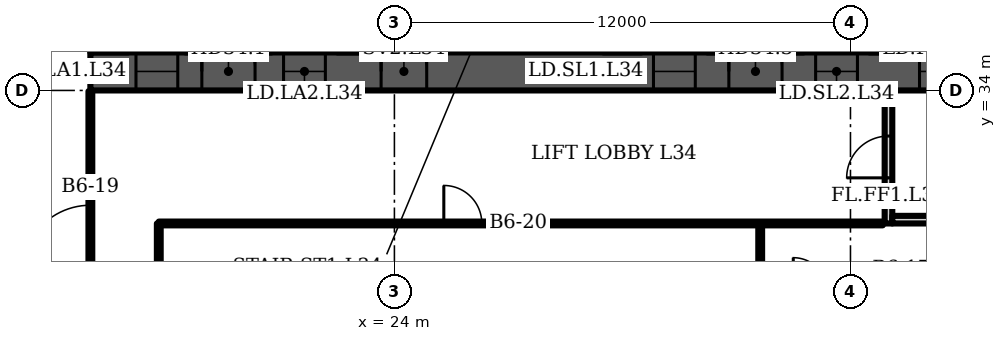
"""IFC4 building model, lengths in metres.
Left out: names, types, materials, properties, quantities, classifications, styles, units other than length and angle.
Written with IfcOpenShell. Run it as: python <this file> out.ifc"""

import sys

from ifc_helpers import new_model, si_unit, direction, frame, frame_2d, origin, place, context, subcontext, project, spatial, rectangle, extrude, element, fill, save


model = new_model("IFC4")
c1 = context("Model", 3, precision=1e-05, world=origin(), true_north=direction((0.0, 1.0)))
c2 = subcontext(c1, "Body", "Model", "MODEL_VIEW")
j1 = project(units=[si_unit("LENGTHUNIT", "METRE"), si_unit("PLANEANGLEUNIT", "RADIAN")], contexts=[c1])
p1 = place(None, origin())
s1 = spatial("IfcSite", under=j1, at=p1, CompositionType="ELEMENT")
p2 = place(p1, origin())
s2 = spatial("IfcBuilding", under=s1, at=p2, CompositionType="ELEMENT")
p3 = place(p2, frame((0.0, 0.0, 143.5)))
s3 = spatial("IfcBuildingStorey", under=s2, at=p3, CompositionType="ELEMENT", Elevation=143.5)
p4 = place(p3, frame((16.0, 34.5, 0.0), z_axis=(0.0, 0.0, 1.0), x_axis=(1.0, 0.0, 0.0)))
e1 = element("IfcWall", 1, at=p4, inside=s3, PredefinedType="SHEAR", context=c2, shape_type="SweptSolid", body=[
    extrude(rectangle(XDim=49.0, YDim=1.0, at=frame_2d((24.5, 0.0))), origin(), (0.0, 0.0, 1.0), 3.6),
])
p5 = place(p4, frame((1.2, 0.0, 0.0)))
e2 = element("IfcOpeningElement", 2, at=p5, cuts=e1, PredefinedType="OPENING", context=c2, shape_type="SweptSolid", body=[
    extrude(rectangle(XDim=1.1, YDim=2.1, at=frame_2d((0.55, 1.05))), frame((0.0, 0.51, 0.0), z_axis=(0.0, -1.0, 0.0), x_axis=(1.0, 0.0, 0.0)), (0.0, 0.0, 1.0), 1.02),
])
p6 = place(p4, frame((5.083, 0.0, 0.0)))
e3 = element("IfcOpeningElement", 3, at=p6, cuts=e1, PredefinedType="OPENING", context=c2, shape_type="SweptSolid", body=[
    extrude(rectangle(XDim=1.1, YDim=2.1, at=frame_2d((0.55, 1.05))), frame((0.0, 0.51, 0.0), z_axis=(0.0, -1.0, 0.0), x_axis=(1.0, 0.0, 0.0)), (0.0, 0.0, 1.0), 1.02),
])
p7 = place(p4, frame((2.933, 0.0, 0.0)))
e4 = element("IfcOpeningElement", 4, at=p7, cuts=e1, PredefinedType="OPENING", context=c2, shape_type="SweptSolid", body=[
    extrude(rectangle(XDim=1.4, YDim=2.1, at=frame_2d((0.7, 1.05))), frame((0.0, 0.51, 0.0), z_axis=(0.0, -1.0, 0.0), x_axis=(1.0, 0.0, 0.0)), (0.0, 0.0, 1.0), 1.02),
])
p8 = place(p4, frame((7.65, 0.0, 0.0)))
e5 = element("IfcOpeningElement", 5, at=p8, cuts=e1, PredefinedType="OPENING", context=c2, shape_type="SweptSolid", body=[
    extrude(rectangle(XDim=1.2, YDim=2.1, at=frame_2d((0.6, 1.05))), frame((0.0, 0.51, 0.0), z_axis=(0.0, -1.0, 0.0), x_axis=(1.0, 0.0, 0.0)), (0.0, 0.0, 1.0), 1.02),
])
p9 = place(p4, frame((14.817, 0.0, 0.0)))
e6 = element("IfcOpeningElement", 6, at=p9, cuts=e1, PredefinedType="OPENING", context=c2, shape_type="SweptSolid", body=[
    extrude(rectangle(XDim=1.1, YDim=2.1, at=frame_2d((0.55, 1.05))), frame((0.0, 0.51, 0.0), z_axis=(0.0, -1.0, 0.0), x_axis=(1.0, 0.0, 0.0)), (0.0, 0.0, 1.0), 1.02),
])
p10 = place(p4, frame((19.083, 0.0, 0.0)))
e7 = element("IfcOpeningElement", 7, at=p10, cuts=e1, PredefinedType="OPENING", context=c2, shape_type="SweptSolid", body=[
    extrude(rectangle(XDim=1.1, YDim=2.1, at=frame_2d((0.55, 1.05))), frame((0.0, 0.51, 0.0), z_axis=(0.0, -1.0, 0.0), x_axis=(1.0, 0.0, 0.0)), (0.0, 0.0, 1.0), 1.02),
])
p11 = place(p4, frame((16.8, 0.0, 0.0)))
e8 = element("IfcOpeningElement", 8, at=p11, cuts=e1, PredefinedType="OPENING", context=c2, shape_type="SweptSolid", body=[
    extrude(rectangle(XDim=1.4, YDim=2.1, at=frame_2d((0.7, 1.05))), frame((0.0, 0.51, 0.0), z_axis=(0.0, -1.0, 0.0), x_axis=(1.0, 0.0, 0.0)), (0.0, 0.0, 1.0), 1.02),
])
p12 = place(p4, frame((21.817, 0.0, 0.0)))
e9 = element("IfcOpeningElement", 9, at=p12, cuts=e1, PredefinedType="OPENING", context=c2, shape_type="SweptSolid", body=[
    extrude(rectangle(XDim=1.1, YDim=2.1, at=frame_2d((0.55, 1.05))), frame((0.0, 0.51, 0.0), z_axis=(0.0, -1.0, 0.0), x_axis=(1.0, 0.0, 0.0)), (0.0, 0.0, 1.0), 1.02),
])
p13 = place(p4, frame((26.083, 0.0, 0.0)))
e10 = element("IfcOpeningElement", 10, at=p13, cuts=e1, PredefinedType="OPENING", context=c2, shape_type="SweptSolid", body=[
    extrude(rectangle(XDim=1.1, YDim=2.1, at=frame_2d((0.55, 1.05))), frame((0.0, 0.51, 0.0), z_axis=(0.0, -1.0, 0.0), x_axis=(1.0, 0.0, 0.0)), (0.0, 0.0, 1.0), 1.02),
])
p14 = place(p4, frame((33.15, 0.0, 0.0)))
e11 = element("IfcOpeningElement", 11, at=p14, cuts=e1, PredefinedType="OPENING", context=c2, shape_type="SweptSolid", body=[
    extrude(rectangle(XDim=1.2, YDim=2.1, at=frame_2d((0.6, 1.05))), frame((0.0, 0.51, 0.0), z_axis=(0.0, -1.0, 0.0), x_axis=(1.0, 0.0, 0.0)), (0.0, 0.0, 1.0), 1.02),
])
p15 = place(p4, frame((37.8, 0.0, 0.0)))
e12 = element("IfcOpeningElement", 12, at=p15, cuts=e1, PredefinedType="OPENING", context=c2, shape_type="SweptSolid", body=[
    extrude(rectangle(XDim=1.4, YDim=2.1, at=frame_2d((0.7, 1.05))), frame((0.0, 0.51, 0.0), z_axis=(0.0, -1.0, 0.0), x_axis=(1.0, 0.0, 0.0)), (0.0, 0.0, 1.0), 1.02),
])
p16 = place(p4, frame((42.817, 0.0, 0.0)))
e13 = element("IfcOpeningElement", 13, at=p16, cuts=e1, PredefinedType="OPENING", context=c2, shape_type="SweptSolid", body=[
    extrude(rectangle(XDim=1.1, YDim=2.1, at=frame_2d((0.55, 1.05))), frame((0.0, 0.51, 0.0), z_axis=(0.0, -1.0, 0.0), x_axis=(1.0, 0.0, 0.0)), (0.0, 0.0, 1.0), 1.02),
])
p17 = place(p4, frame((46.7, 0.0, 0.0)))
e14 = element("IfcOpeningElement", 14, at=p17, cuts=e1, PredefinedType="OPENING", context=c2, shape_type="SweptSolid", body=[
    extrude(rectangle(XDim=1.1, YDim=2.1, at=frame_2d((0.55, 1.05))), frame((0.0, 0.51, 0.0), z_axis=(0.0, -1.0, 0.0), x_axis=(1.0, 0.0, 0.0)), (0.0, 0.0, 1.0), 1.02),
])
p18 = place(p4, frame((44.667, 0.0, 0.0)))
e15 = element("IfcOpeningElement", 15, at=p18, cuts=e1, PredefinedType="OPENING", context=c2, shape_type="SweptSolid", body=[
    extrude(rectangle(XDim=1.4, YDim=2.1, at=frame_2d((0.7, 1.05))), frame((0.0, 0.51, 0.0), z_axis=(0.0, -1.0, 0.0), x_axis=(1.0, 0.0, 0.0)), (0.0, 0.0, 1.0), 1.02),
])
p19 = place(p3, frame((37.0, 30.5, 0.0), z_axis=(0.0, 0.0, 1.0), x_axis=(0.0, 1.0, 0.0)))
e16 = element("IfcWall", 16, at=p19, inside=s3, PredefinedType="PARTITIONING", context=c2, shape_type="SweptSolid", body=[
    extrude(rectangle(XDim=3.5, YDim=0.2, at=frame_2d((1.75, 0.0))), origin(), (0.0, 0.0, 1.0), 3.15),
])
p20 = place(p19, frame((1.2, 0.0, 0.0)))
e17 = element("IfcOpeningElement", 17, at=p20, cuts=e16, PredefinedType="OPENING", context=c2, shape_type="SweptSolid", body=[
    extrude(rectangle(XDim=1.1, YDim=2.1, at=frame_2d((0.55, 1.05))), frame((0.0, 0.11, 0.0), z_axis=(0.0, -1.0, 0.0), x_axis=(1.0, 0.0, 0.0)), (0.0, 0.0, 1.0), 0.22),
])
p21 = place(p3, frame((37.1, 30.6, 0.0), z_axis=(0.0, 0.0, 1.0), x_axis=(1.0, 0.0, 0.0)))
e18 = element("IfcWall", 18, at=p21, inside=s3, PredefinedType="PARTITIONING", context=c2, shape_type="SweptSolid", body=[
    extrude(rectangle(XDim=2.8, YDim=0.2, at=frame_2d((1.4, 0.0))), origin(), (0.0, 0.0, 1.0), 3.15),
])
p22 = place(p3, frame((16.0, 26.22, 0.0), z_axis=(0.0, 0.0, 1.0), x_axis=(0.0, 1.0, 0.0)))
e19 = element("IfcWall", 19, at=p22, inside=s3, PredefinedType="PARTITIONING", context=c2, shape_type="SweptSolid", body=[
    extrude(rectangle(XDim=7.76, YDim=0.1, at=frame_2d((3.88, 0.0))), origin(), (0.0, 0.0, 1.0), 3.15),
])
p23 = place(p22, frame((2.96, 0.0, 0.0)))
e20 = element("IfcOpeningElement", 20, at=p23, cuts=e19, PredefinedType="OPENING", context=c2, shape_type="SweptSolid", body=[
    extrude(rectangle(XDim=1.8, YDim=2.1, at=frame_2d((0.9, 1.05))), frame((0.0, 0.06, 0.0), z_axis=(0.0, -1.0, 0.0), x_axis=(1.0, 0.0, 0.0)), (0.0, 0.0, 1.0), 0.12),
])
p24 = place(p3, frame((17.8, 23.935, 0.0), z_axis=(0.0, 0.0, 1.0), x_axis=(0.0, 1.0, 0.0)))
e21 = element("IfcWall", 21, at=p24, inside=s3, PredefinedType="PARTITIONING", context=c2, shape_type="SweptSolid", body=[
    extrude(rectangle(XDim=6.565, YDim=0.1, at=frame_2d((3.282, 0.0))), origin(), (0.0, 0.0, 1.0), 3.15),
])
p25 = place(p3, frame((17.8, 30.5, 0.0), z_axis=(0.0, 0.0, 1.0), x_axis=(1.0, 0.0, 0.0)))
e22 = element("IfcWall", 22, at=p25, inside=s3, PredefinedType="PARTITIONING", context=c2, shape_type="SweptSolid", body=[
    extrude(rectangle(XDim=19.05, YDim=0.1, at=frame_2d((9.525, 0.0))), origin(), (0.0, 0.0, 1.0), 3.15),
])
p26 = place(p25, frame((7.5, 0.0, 0.0)))
e23 = element("IfcOpeningElement", 23, at=p26, cuts=e22, PredefinedType="OPENING", context=c2, shape_type="SweptSolid", body=[
    extrude(rectangle(XDim=1.0, YDim=2.1, at=frame_2d((0.5, 1.05))), frame((0.0, 0.06, 0.0), z_axis=(0.0, -1.0, 0.0), x_axis=(1.0, 0.0, 0.0)), (0.0, 0.0, 1.0), 0.12),
])
p27 = place(p3, frame((33.625, 14.53, 0.0), z_axis=(0.0, 0.0, 1.0), x_axis=(0.0, 1.0, 0.0)))
e24 = element("IfcWall", 24, at=p27, inside=s3, PredefinedType="PARTITIONING", context=c2, shape_type="SweptSolid", body=[
    extrude(rectangle(XDim=15.96, YDim=0.1, at=frame_2d((7.98, 0.0))), origin(), (0.0, 0.0, 1.0), 3.15),
])
p28 = place(p5, origin())
e25 = element("IfcDoor", 25, at=p28, inside=s3, OperationType="DOUBLE_DOOR_SLIDING", PredefinedType="DOOR", context=c2, shape_type="SweptSolid", body=[
    extrude(rectangle(XDim=1.1, YDim=2.1, at=frame_2d((0.55, 1.05))), frame((0.0, 0.025, 0.0), z_axis=(0.0, -1.0, 0.0), x_axis=(1.0, 0.0, 0.0)), (0.0, 0.0, 1.0), 0.05),
])
fill(e2, e25)
p29 = place(p6, origin())
e26 = element("IfcDoor", 26, at=p29, inside=s3, OperationType="DOUBLE_DOOR_SLIDING", PredefinedType="DOOR", context=c2, shape_type="SweptSolid", body=[
    extrude(rectangle(XDim=1.1, YDim=2.1, at=frame_2d((0.55, 1.05))), frame((0.0, 0.025, 0.0), z_axis=(0.0, -1.0, 0.0), x_axis=(1.0, 0.0, 0.0)), (0.0, 0.0, 1.0), 0.05),
])
fill(e3, e26)
p30 = place(p7, origin())
e27 = element("IfcDoor", 27, at=p30, inside=s3, OperationType="DOUBLE_DOOR_SINGLE_SWING", PredefinedType="DOOR", context=c2, shape_type="SweptSolid", body=[
    extrude(rectangle(XDim=1.4, YDim=2.1, at=frame_2d((0.7, 1.05))), frame((0.0, 0.025, 0.0), z_axis=(0.0, -1.0, 0.0), x_axis=(1.0, 0.0, 0.0)), (0.0, 0.0, 1.0), 0.05),
])
fill(e4, e27)
p31 = place(p8, origin())
e28 = element("IfcDoor", 28, at=p31, inside=s3, OperationType="SINGLE_SWING_LEFT", PredefinedType="DOOR", context=c2, shape_type="SweptSolid", body=[
    extrude(rectangle(XDim=1.2, YDim=2.1, at=frame_2d((0.6, 1.05))), frame((0.0, 0.025, 0.0), z_axis=(0.0, -1.0, 0.0), x_axis=(1.0, 0.0, 0.0)), (0.0, 0.0, 1.0), 0.05),
])
fill(e5, e28)
p32 = place(p9, origin())
e29 = element("IfcDoor", 29, at=p32, inside=s3, OperationType="DOUBLE_DOOR_SLIDING", PredefinedType="DOOR", context=c2, shape_type="SweptSolid", body=[
    extrude(rectangle(XDim=1.1, YDim=2.1, at=frame_2d((0.55, 1.05))), frame((0.0, 0.025, 0.0), z_axis=(0.0, -1.0, 0.0), x_axis=(1.0, 0.0, 0.0)), (0.0, 0.0, 1.0), 0.05),
])
fill(e6, e29)
p33 = place(p10, origin())
e30 = element("IfcDoor", 30, at=p33, inside=s3, OperationType="DOUBLE_DOOR_SLIDING", PredefinedType="DOOR", context=c2, shape_type="SweptSolid", body=[
    extrude(rectangle(XDim=1.1, YDim=2.1, at=frame_2d((0.55, 1.05))), frame((0.0, 0.025, 0.0), z_axis=(0.0, -1.0, 0.0), x_axis=(1.0, 0.0, 0.0)), (0.0, 0.0, 1.0), 0.05),
])
fill(e7, e30)
p34 = place(p11, origin())
e31 = element("IfcDoor", 31, at=p34, inside=s3, OperationType="DOUBLE_DOOR_SINGLE_SWING", PredefinedType="DOOR", context=c2, shape_type="SweptSolid", body=[
    extrude(rectangle(XDim=1.4, YDim=2.1, at=frame_2d((0.7, 1.05))), frame((0.0, 0.025, 0.0), z_axis=(0.0, -1.0, 0.0), x_axis=(1.0, 0.0, 0.0)), (0.0, 0.0, 1.0), 0.05),
])
fill(e8, e31)
p35 = place(p12, origin())
e32 = element("IfcDoor", 32, at=p35, inside=s3, OperationType="DOUBLE_DOOR_SLIDING", PredefinedType="DOOR", context=c2, shape_type="SweptSolid", body=[
    extrude(rectangle(XDim=1.1, YDim=2.1, at=frame_2d((0.55, 1.05))), frame((0.0, 0.025, 0.0), z_axis=(0.0, -1.0, 0.0), x_axis=(1.0, 0.0, 0.0)), (0.0, 0.0, 1.0), 0.05),
])
fill(e9, e32)
p36 = place(p20, origin())
e33 = element("IfcDoor", 33, at=p36, inside=s3, OperationType="SINGLE_SWING_LEFT", PredefinedType="DOOR", context=c2, shape_type="SweptSolid", body=[
    extrude(rectangle(XDim=1.1, YDim=2.1, at=frame_2d((0.55, 1.05))), frame((0.0, 0.025, 0.0), z_axis=(0.0, -1.0, 0.0), x_axis=(1.0, 0.0, 0.0)), (0.0, 0.0, 1.0), 0.05),
])
fill(e17, e33)
p37 = place(p23, origin())
e34 = element("IfcDoor", 34, at=p37, inside=s3, OperationType="DOUBLE_DOOR_SINGLE_SWING", PredefinedType="DOOR", context=c2, shape_type="SweptSolid", body=[
    extrude(rectangle(XDim=1.8, YDim=2.1, at=frame_2d((0.9, 1.05))), frame((0.0, 0.025, 0.0), z_axis=(0.0, -1.0, 0.0), x_axis=(1.0, 0.0, 0.0)), (0.0, 0.0, 1.0), 0.05),
])
fill(e20, e34)
p38 = place(p26, origin())
e35 = element("IfcDoor", 35, at=p38, inside=s3, OperationType="SINGLE_SWING_LEFT", PredefinedType="DOOR", context=c2, shape_type="SweptSolid", body=[
    extrude(rectangle(XDim=1.0, YDim=2.1, at=frame_2d((0.5, 1.05))), frame((0.0, 0.025, 0.0), z_axis=(0.0, -1.0, 0.0), x_axis=(1.0, 0.0, 0.0)), (0.0, 0.0, 1.0), 0.05),
])
fill(e23, e35)
save(model, sys.argv[1])
